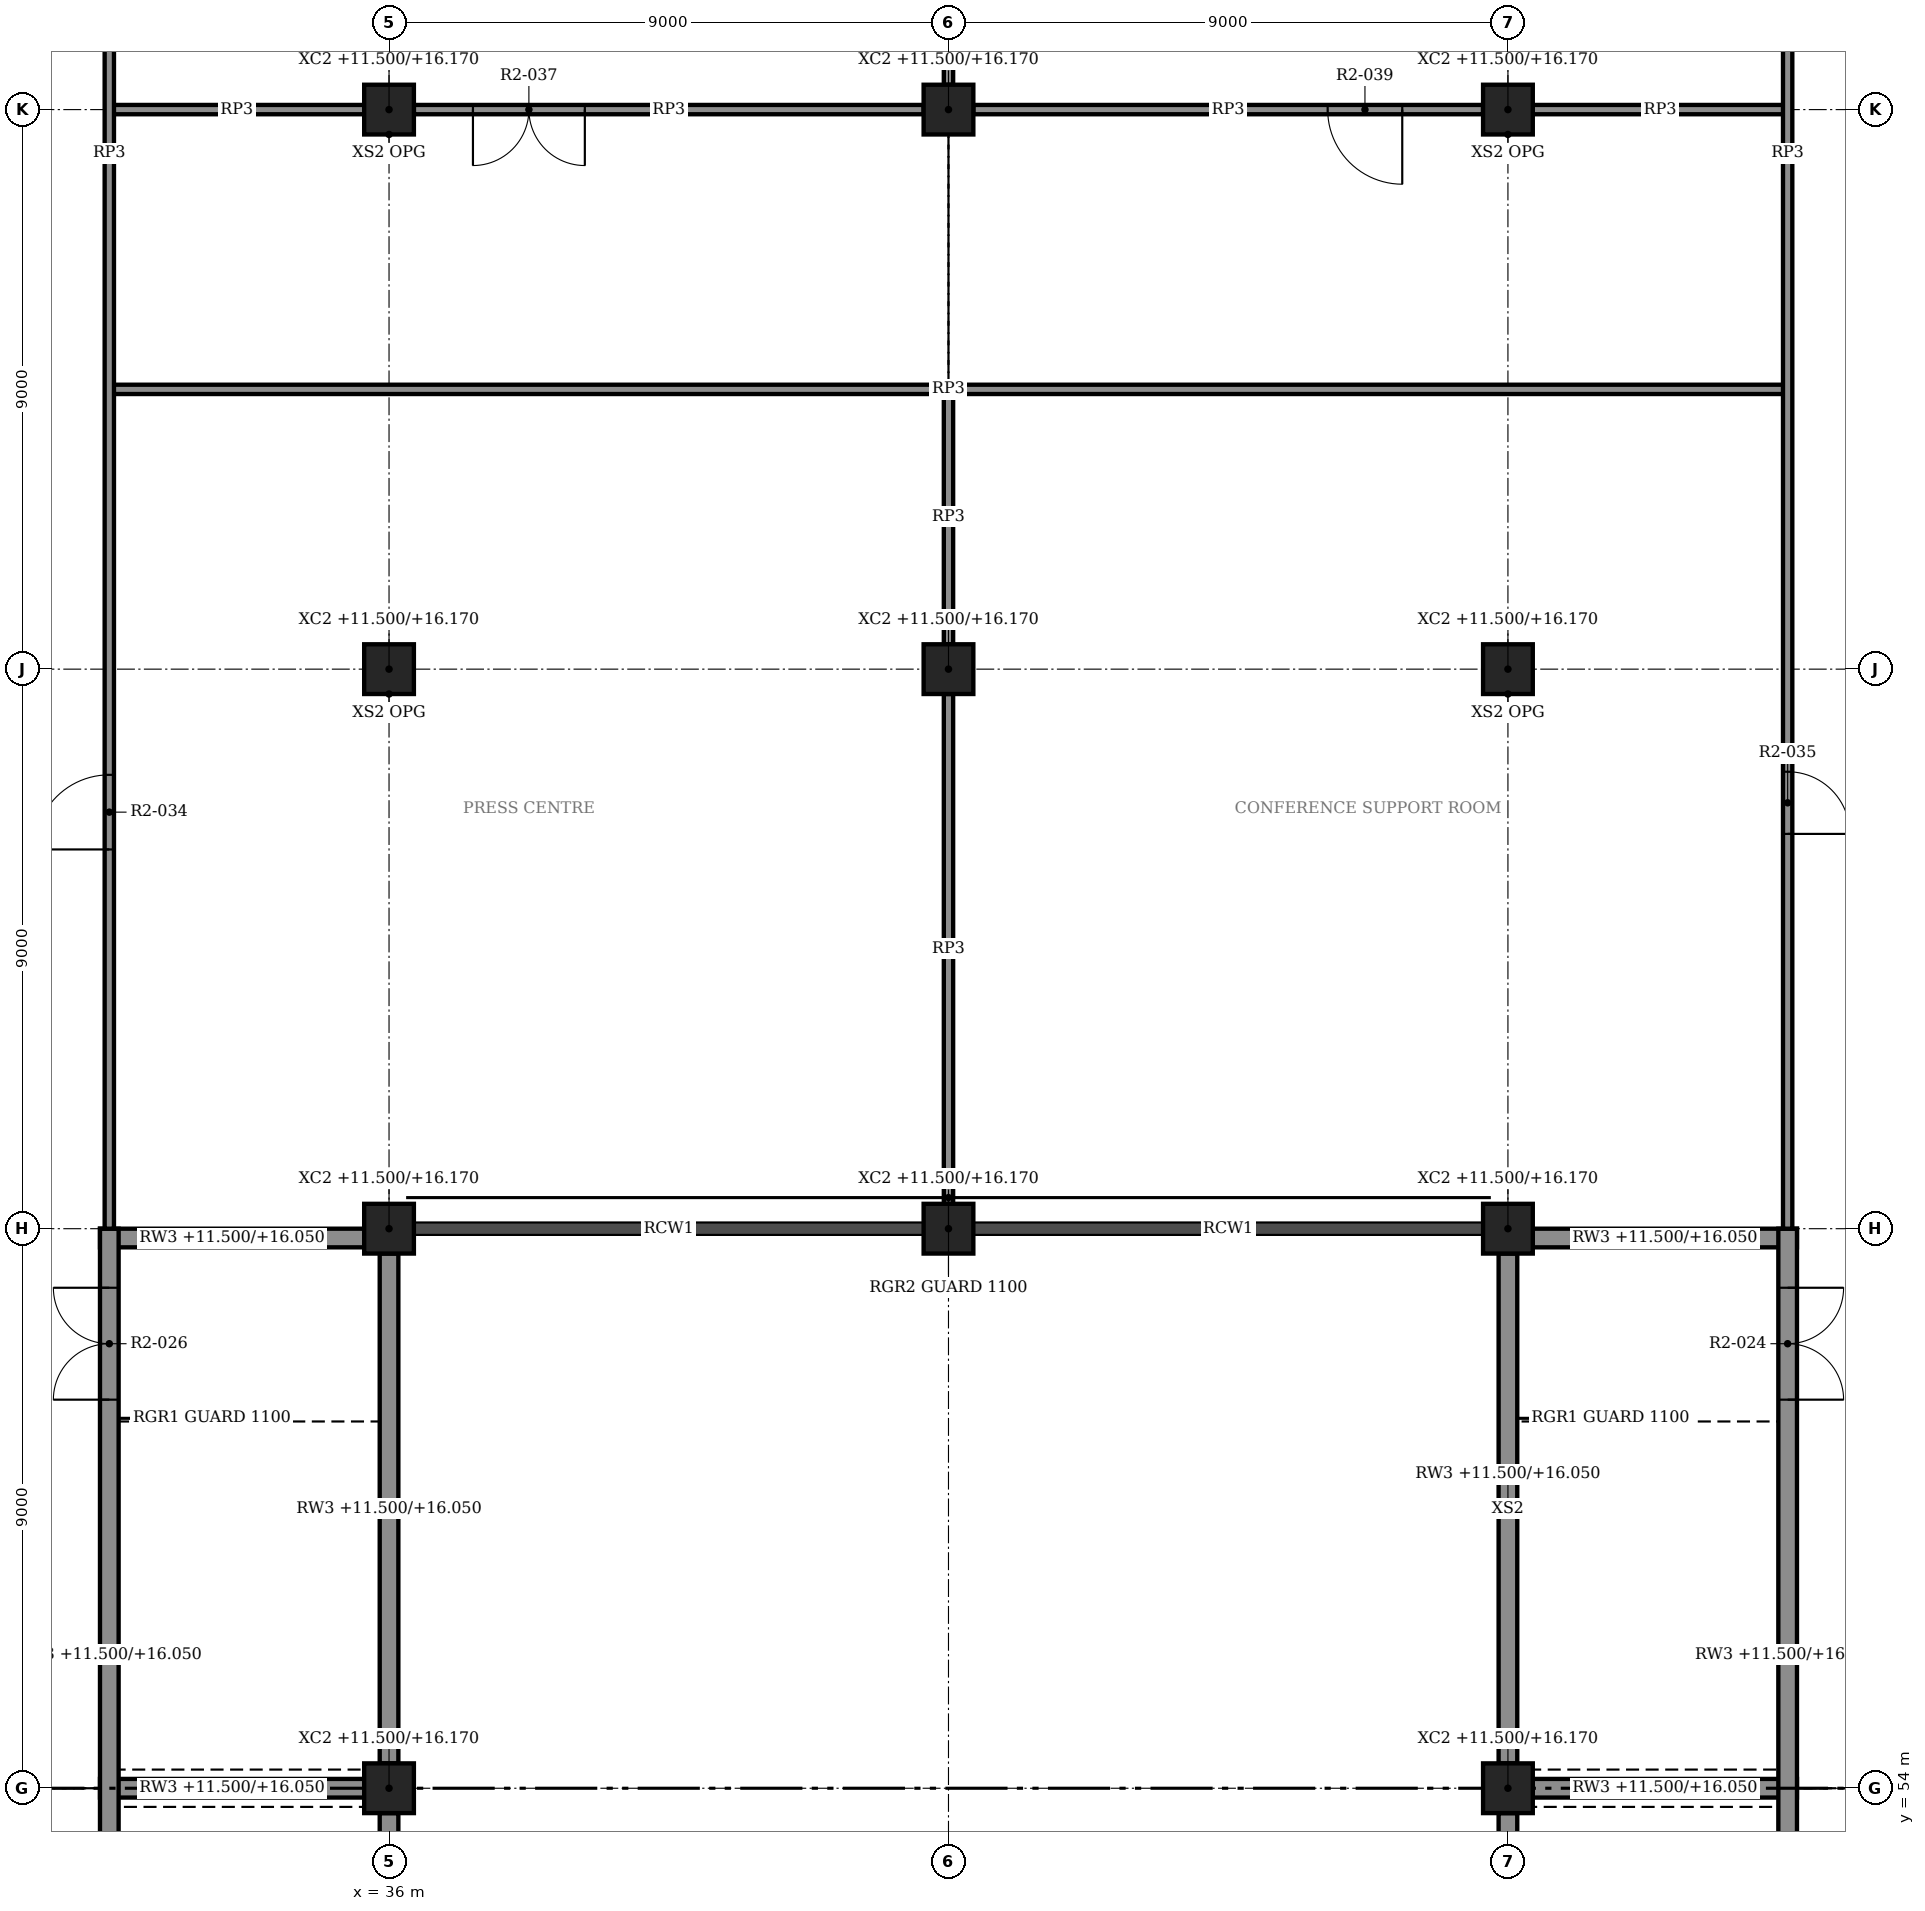
"""IFC4 building model, lengths in metres.
Left out: names, types, materials, properties, quantities, classifications, styles, units other than length and angle.
Written with IfcOpenShell. Run it as: python <this file> out.ifc"""

import sys

from ifc_helpers import new_model, si_unit, direction, frame, frame_2d, origin, origin_2d, place, context, subcontext, project, spatial, rectangle, extrude, element, fill, save


model = new_model("IFC4")
c1 = context("Model", 3, precision=1e-05, world=origin(), true_north=direction((0.0, 1.0)))
c2 = subcontext(c1, "Body", "Model", "MODEL_VIEW")
j1 = project(units=[si_unit("LENGTHUNIT", "METRE"), si_unit("PLANEANGLEUNIT", "RADIAN")], contexts=[c1])
p1 = place(None, origin())
s1 = spatial("IfcSite", under=j1, at=p1, CompositionType="ELEMENT")
p2 = place(p1, origin())
s2 = spatial("IfcBuilding", under=s1, at=p2, CompositionType="ELEMENT")
p3 = place(p2, frame((0.0, 0.0, 11.5)))
s3 = spatial("IfcBuildingStorey", under=s2, at=p3, CompositionType="ELEMENT", Elevation=11.5)
for number, where, z_axis, x_axis in (
    (1, (36.0, 54.0, 0.0), (0.0, 0.0, 1.0), (1.0, 0.0, 0.0)),
    (2, (36.0, 63.0, 0.0), (0.0, 0.0, 1.0), (1.0, 0.0, 0.0)),
    (3, (36.0, 72.0, 0.0), (0.0, 0.0, 1.0), (1.0, 0.0, 0.0)),
    (4, (36.0, 81.0, 0.0), (0.0, 0.0, 1.0), (1.0, 0.0, 0.0)),
    (5, (45.0, 63.0, 0.0), (0.0, 0.0, 1.0), (1.0, 0.0, 0.0)),
    (6, (45.0, 72.0, 0.0), (0.0, 0.0, 1.0), (1.0, 0.0, 0.0)),
    (7, (45.0, 81.0, 0.0), (0.0, 0.0, 1.0), (1.0, 0.0, 0.0)),
    (8, (54.0, 54.0, 0.0), (0.0, 0.0, 1.0), (1.0, 0.0, 0.0)),
    (9, (54.0, 63.0, 0.0), (0.0, 0.0, 1.0), (1.0, 0.0, 0.0)),
    (10, (54.0, 72.0, 0.0), (0.0, 0.0, 1.0), (1.0, 0.0, 0.0)),
    (11, (54.0, 81.0, 0.0), (0.0, 0.0, 1.0), (1.0, 0.0, 0.0)),
):
    element("IfcColumn", number, at=place(p3, frame(where, z_axis=z_axis, x_axis=x_axis)), inside=s3, PredefinedType="COLUMN", context=c2, shape_type="SweptSolid", body=[
        extrude(rectangle(XDim=0.8, YDim=0.8, at=origin_2d()), origin(), (0.0, 0.0, 1.0), 4.67),
    ])
p4 = place(p3, frame((58.5, 45.0, 0.0), z_axis=(0.0, 0.0, 1.0), x_axis=(0.0, 1.0, 0.0)))
e12 = element("IfcWall", 12, at=p4, inside=s3, PredefinedType="SOLIDWALL", context=c2, shape_type="SweptSolid", body=[
    extrude(rectangle(XDim=18.0, YDim=0.3, at=frame_2d((9.0, 0.0))), origin(), (0.0, 0.0, 1.0), 4.55),
])
p5 = place(p4, frame((0.85, 0.0, 0.0)))
e13 = element("IfcOpeningElement", 13, at=p5, cuts=e12, PredefinedType="OPENING", context=c2, shape_type="SweptSolid", body=[
    extrude(rectangle(XDim=1.8, YDim=2.4, at=frame_2d((0.9, 1.2))), frame((0.0, 0.16, 0.0), z_axis=(0.0, -1.0, 0.0), x_axis=(1.0, 0.0, 0.0)), (0.0, 0.0, 1.0), 0.32),
])
p6 = place(p4, frame((15.25, 0.0, 0.0)))
e14 = element("IfcOpeningElement", 14, at=p6, cuts=e12, PredefinedType="OPENING", context=c2, shape_type="SweptSolid", body=[
    extrude(rectangle(XDim=1.8, YDim=2.4, at=frame_2d((0.9, 1.2))), frame((0.0, 0.16, 0.0), z_axis=(0.0, -1.0, 0.0), x_axis=(1.0, 0.0, 0.0)), (0.0, 0.0, 1.0), 0.32),
])
for number, where, z_axis, x_axis in (
    (15, (54.0, 45.4, 0.0), (0.0, 0.0, 1.0), (0.0, 1.0, 0.0)),
    (16, (54.0, 54.4, 0.0), (0.0, 0.0, 1.0), (0.0, 1.0, 0.0)),
):
    element("IfcWall", number, at=place(p3, frame(where, z_axis=z_axis, x_axis=x_axis)), inside=s3, PredefinedType="SOLIDWALL", context=c2, shape_type="SweptSolid", body=[
        extrude(rectangle(XDim=8.2, YDim=0.3, at=frame_2d((4.1, 0.0))), origin(), (0.0, 0.0, 1.0), 4.55),
    ])
for number, where, z_axis, x_axis in (
    (17, (54.4, 54.0, 0.0), (0.0, 0.0, 1.0), (1.0, 0.0, 0.0)),
    (18, (54.4, 62.85, 0.0), (0.0, 0.0, 1.0), (1.0, 0.0, 0.0)),
):
    element("IfcWall", number, at=place(p3, frame(where, z_axis=z_axis, x_axis=x_axis)), inside=s3, PredefinedType="SOLIDWALL", context=c2, shape_type="SweptSolid", body=[
        extrude(rectangle(XDim=4.25, YDim=0.3, at=frame_2d((2.125, 0.0))), origin(), (0.0, 0.0, 1.0), 4.55),
    ])
p7 = place(p3, frame((31.5, 45.0, 0.0), z_axis=(0.0, 0.0, 1.0), x_axis=(0.0, 1.0, 0.0)))
e19 = element("IfcWall", 19, at=p7, inside=s3, PredefinedType="SOLIDWALL", context=c2, shape_type="SweptSolid", body=[
    extrude(rectangle(XDim=18.0, YDim=0.3, at=frame_2d((9.0, 0.0))), origin(), (0.0, 0.0, 1.0), 4.55),
])
p8 = place(p7, frame((0.85, 0.0, 0.0)))
e20 = element("IfcOpeningElement", 20, at=p8, cuts=e19, PredefinedType="OPENING", context=c2, shape_type="SweptSolid", body=[
    extrude(rectangle(XDim=1.8, YDim=2.4, at=frame_2d((0.9, 1.2))), frame((0.0, 0.16, 0.0), z_axis=(0.0, -1.0, 0.0), x_axis=(1.0, 0.0, 0.0)), (0.0, 0.0, 1.0), 0.32),
])
p9 = place(p7, frame((15.25, 0.0, 0.0)))
e21 = element("IfcOpeningElement", 21, at=p9, cuts=e19, PredefinedType="OPENING", context=c2, shape_type="SweptSolid", body=[
    extrude(rectangle(XDim=1.8, YDim=2.4, at=frame_2d((0.9, 1.2))), frame((0.0, 0.16, 0.0), z_axis=(0.0, -1.0, 0.0), x_axis=(1.0, 0.0, 0.0)), (0.0, 0.0, 1.0), 0.32),
])
for number, where, z_axis, x_axis in (
    (22, (36.0, 45.4, 0.0), (0.0, 0.0, 1.0), (0.0, 1.0, 0.0)),
    (23, (36.0, 54.4, 0.0), (0.0, 0.0, 1.0), (0.0, 1.0, 0.0)),
):
    element("IfcWall", number, at=place(p3, frame(where, z_axis=z_axis, x_axis=x_axis)), inside=s3, PredefinedType="SOLIDWALL", context=c2, shape_type="SweptSolid", body=[
        extrude(rectangle(XDim=8.2, YDim=0.3, at=frame_2d((4.1, 0.0))), origin(), (0.0, 0.0, 1.0), 4.55),
    ])
for number, where, z_axis, x_axis in (
    (24, (31.35, 54.0, 0.0), (0.0, 0.0, 1.0), (1.0, 0.0, 0.0)),
    (25, (31.35, 62.85, 0.0), (0.0, 0.0, 1.0), (1.0, 0.0, 0.0)),
):
    element("IfcWall", number, at=place(p3, frame(where, z_axis=z_axis, x_axis=x_axis)), inside=s3, PredefinedType="SOLIDWALL", context=c2, shape_type="SweptSolid", body=[
        extrude(rectangle(XDim=4.25, YDim=0.3, at=frame_2d((2.125, 0.0))), origin(), (0.0, 0.0, 1.0), 4.55),
    ])
p10 = place(p3, frame((31.5, 76.5, 0.0), z_axis=(0.0, 0.0, 1.0), x_axis=(1.0, 0.0, 0.0)))
e26 = element("IfcWall", 26, at=p10, inside=s3, PredefinedType="PARTITIONING", context=c2, shape_type="SweptSolid", body=[
    extrude(rectangle(XDim=27.0, YDim=0.15, at=frame_2d((13.5, 0.0))), origin(), (0.0, 0.0, 1.0), 4.55),
])
p11 = place(p3, frame((31.5, 81.0, 0.0), z_axis=(0.0, 0.0, 1.0), x_axis=(1.0, 0.0, 0.0)))
e27 = element("IfcWall", 27, at=p11, inside=s3, PredefinedType="PARTITIONING", context=c2, shape_type="SweptSolid", body=[
    extrude(rectangle(XDim=4.1, YDim=0.15, at=frame_2d((2.05, 0.0))), origin(), (0.0, 0.0, 1.0), 4.55),
])
p12 = place(p3, frame((36.4, 81.0, 0.0), z_axis=(0.0, 0.0, 1.0), x_axis=(1.0, 0.0, 0.0)))
e28 = element("IfcWall", 28, at=p12, inside=s3, PredefinedType="PARTITIONING", context=c2, shape_type="SweptSolid", body=[
    extrude(rectangle(XDim=8.2, YDim=0.15, at=frame_2d((4.1, 0.0))), origin(), (0.0, 0.0, 1.0), 4.55),
])
p13 = place(p12, frame((0.95, 0.0, 0.0)))
e29 = element("IfcOpeningElement", 29, at=p13, cuts=e28, PredefinedType="OPENING", context=c2, shape_type="SweptSolid", body=[
    extrude(rectangle(XDim=1.8, YDim=2.4, at=frame_2d((0.9, 1.2))), frame((0.0, 0.085, 0.0), z_axis=(0.0, -1.0, 0.0), x_axis=(1.0, 0.0, 0.0)), (0.0, 0.0, 1.0), 0.17),
])
p14 = place(p3, frame((45.4, 81.0, 0.0), z_axis=(0.0, 0.0, 1.0), x_axis=(1.0, 0.0, 0.0)))
e30 = element("IfcWall", 30, at=p14, inside=s3, PredefinedType="PARTITIONING", context=c2, shape_type="SweptSolid", body=[
    extrude(rectangle(XDim=8.2, YDim=0.15, at=frame_2d((4.1, 0.0))), origin(), (0.0, 0.0, 1.0), 4.55),
])
p15 = place(p14, frame((5.7, 0.0, 0.0)))
e31 = element("IfcOpeningElement", 31, at=p15, cuts=e30, PredefinedType="OPENING", context=c2, shape_type="SweptSolid", body=[
    extrude(rectangle(XDim=1.2, YDim=2.4, at=frame_2d((0.6, 1.2))), frame((0.0, 0.085, 0.0), z_axis=(0.0, -1.0, 0.0), x_axis=(1.0, 0.0, 0.0)), (0.0, 0.0, 1.0), 0.17),
])
p16 = place(p3, frame((54.4, 81.0, 0.0), z_axis=(0.0, 0.0, 1.0), x_axis=(1.0, 0.0, 0.0)))
e32 = element("IfcWall", 32, at=p16, inside=s3, PredefinedType="PARTITIONING", context=c2, shape_type="SweptSolid", body=[
    extrude(rectangle(XDim=4.1, YDim=0.15, at=frame_2d((2.05, 0.0))), origin(), (0.0, 0.0, 1.0), 4.55),
])
p17 = place(p3, frame((31.5, 63.0, 0.0), z_axis=(0.0, 0.0, 1.0), x_axis=(0.0, 1.0, 0.0)))
e33 = element("IfcWall", 33, at=p17, inside=s3, PredefinedType="PARTITIONING", context=c2, shape_type="SweptSolid", body=[
    extrude(rectangle(XDim=36.0, YDim=0.15, at=frame_2d((18.0, 0.0))), origin(), (0.0, 0.0, 1.0), 4.55),
])
p18 = place(p17, frame((6.1, 0.0, 0.0)))
e34 = element("IfcOpeningElement", 34, at=p18, cuts=e33, PredefinedType="OPENING", context=c2, shape_type="SweptSolid", body=[
    extrude(rectangle(XDim=1.2, YDim=2.4, at=frame_2d((0.6, 1.2))), frame((0.0, 0.085, 0.0), z_axis=(0.0, -1.0, 0.0), x_axis=(1.0, 0.0, 0.0)), (0.0, 0.0, 1.0), 0.17),
])
p19 = place(p17, frame((26.1, 0.0, 0.0)))
e35 = element("IfcOpeningElement", 35, at=p19, cuts=e33, PredefinedType="OPENING", context=c2, shape_type="SweptSolid", body=[
    extrude(rectangle(XDim=1.8, YDim=2.4, at=frame_2d((0.9, 1.2))), frame((0.0, 0.085, 0.0), z_axis=(0.0, -1.0, 0.0), x_axis=(1.0, 0.0, 0.0)), (0.0, 0.0, 1.0), 0.17),
])
p20 = place(p3, frame((45.0, 63.4, 0.0), z_axis=(0.0, 0.0, 1.0), x_axis=(0.0, 1.0, 0.0)))
e36 = element("IfcWall", 36, at=p20, inside=s3, PredefinedType="PARTITIONING", context=c2, shape_type="SweptSolid", body=[
    extrude(rectangle(XDim=8.2, YDim=0.15, at=frame_2d((4.1, 0.0))), origin(), (0.0, 0.0, 1.0), 4.55),
])
p21 = place(p3, frame((45.0, 72.4, 0.0), z_axis=(0.0, 0.0, 1.0), x_axis=(0.0, 1.0, 0.0)))
e37 = element("IfcWall", 37, at=p21, inside=s3, PredefinedType="PARTITIONING", context=c2, shape_type="SweptSolid", body=[
    extrude(rectangle(XDim=4.1, YDim=0.15, at=frame_2d((2.05, 0.0))), origin(), (0.0, 0.0, 1.0), 4.55),
])
p22 = place(p3, frame((45.0, 81.4, 0.0), z_axis=(0.0, 0.0, 1.0), x_axis=(0.0, 1.0, 0.0)))
e38 = element("IfcWall", 38, at=p22, inside=s3, PredefinedType="PARTITIONING", context=c2, shape_type="SweptSolid", body=[
    extrude(rectangle(XDim=8.2, YDim=0.15, at=frame_2d((4.1, 0.0))), origin(), (0.0, 0.0, 1.0), 4.55),
])
p23 = place(p3, frame((58.5, 63.0, 0.0), z_axis=(0.0, 0.0, 1.0), x_axis=(0.0, 1.0, 0.0)))
e39 = element("IfcWall", 39, at=p23, inside=s3, PredefinedType="PARTITIONING", context=c2, shape_type="SweptSolid", body=[
    extrude(rectangle(XDim=36.0, YDim=0.15, at=frame_2d((18.0, 0.0))), origin(), (0.0, 0.0, 1.0), 4.55),
])
p24 = place(p23, frame((6.35, 0.0, 0.0)))
e40 = element("IfcOpeningElement", 40, at=p24, cuts=e39, PredefinedType="OPENING", context=c2, shape_type="SweptSolid", body=[
    extrude(rectangle(XDim=1.0, YDim=2.4, at=frame_2d((0.5, 1.2))), frame((0.0, 0.085, 0.0), z_axis=(0.0, -1.0, 0.0), x_axis=(1.0, 0.0, 0.0)), (0.0, 0.0, 1.0), 0.17),
])
p25 = place(p23, frame((26.35, 0.0, 0.0)))
e41 = element("IfcOpeningElement", 41, at=p25, cuts=e39, PredefinedType="OPENING", context=c2, shape_type="SweptSolid", body=[
    extrude(rectangle(XDim=1.2, YDim=2.4, at=frame_2d((0.6, 1.2))), frame((0.0, 0.085, 0.0), z_axis=(0.0, -1.0, 0.0), x_axis=(1.0, 0.0, 0.0)), (0.0, 0.0, 1.0), 0.17),
])
p26 = place(p6, frame((1.8, 0.0, 0.0), z_axis=(0.0, 0.0, 1.0), x_axis=(-1.0, 0.0, 0.0)))
e42 = element("IfcDoor", 42, at=p26, inside=s3, OperationType="DOUBLE_DOOR_SINGLE_SWING", PredefinedType="DOOR", context=c2, shape_type="SweptSolid", body=[
    extrude(rectangle(XDim=1.8, YDim=2.4, at=frame_2d((0.9, 1.2))), frame((0.0, 0.025, 0.0), z_axis=(0.0, -1.0, 0.0), x_axis=(1.0, 0.0, 0.0)), (0.0, 0.0, 1.0), 0.05),
])
fill(e14, e42)
p27 = place(p9, origin())
e43 = element("IfcDoor", 43, at=p27, inside=s3, OperationType="DOUBLE_DOOR_SINGLE_SWING", PredefinedType="DOOR", context=c2, shape_type="SweptSolid", body=[
    extrude(rectangle(XDim=1.8, YDim=2.4, at=frame_2d((0.9, 1.2))), frame((0.0, 0.025, 0.0), z_axis=(0.0, -1.0, 0.0), x_axis=(1.0, 0.0, 0.0)), (0.0, 0.0, 1.0), 0.05),
])
fill(e21, e43)
p28 = place(p18, origin())
e44 = element("IfcDoor", 44, at=p28, inside=s3, OperationType="SINGLE_SWING_LEFT", PredefinedType="DOOR", context=c2, shape_type="SweptSolid", body=[
    extrude(rectangle(XDim=1.2, YDim=2.4, at=frame_2d((0.6, 1.2))), frame((0.0, 0.025, 0.0), z_axis=(0.0, -1.0, 0.0), x_axis=(1.0, 0.0, 0.0)), (0.0, 0.0, 1.0), 0.05),
])
fill(e34, e44)
p29 = place(p24, frame((1.0, 0.0, 0.0), z_axis=(0.0, 0.0, 1.0), x_axis=(-1.0, 0.0, 0.0)))
e45 = element("IfcDoor", 45, at=p29, inside=s3, OperationType="SINGLE_SWING_LEFT", PredefinedType="DOOR", context=c2, shape_type="SweptSolid", body=[
    extrude(rectangle(XDim=1.0, YDim=2.4, at=frame_2d((0.5, 1.2))), frame((0.0, 0.025, 0.0), z_axis=(0.0, -1.0, 0.0), x_axis=(1.0, 0.0, 0.0)), (0.0, 0.0, 1.0), 0.05),
])
fill(e40, e45)
p30 = place(p13, frame((1.8, 0.0, 0.0), z_axis=(0.0, 0.0, 1.0), x_axis=(-1.0, 0.0, 0.0)))
e46 = element("IfcDoor", 46, at=p30, inside=s3, OperationType="DOUBLE_DOOR_SINGLE_SWING", PredefinedType="DOOR", context=c2, shape_type="SweptSolid", body=[
    extrude(rectangle(XDim=1.8, YDim=2.4, at=frame_2d((0.9, 1.2))), frame((0.0, 0.025, 0.0), z_axis=(0.0, -1.0, 0.0), x_axis=(1.0, 0.0, 0.0)), (0.0, 0.0, 1.0), 0.05),
])
fill(e29, e46)
p31 = place(p15, frame((1.2, 0.0, 0.0), z_axis=(0.0, 0.0, 1.0), x_axis=(-1.0, 0.0, 0.0)))
e47 = element("IfcDoor", 47, at=p31, inside=s3, OperationType="SINGLE_SWING_LEFT", PredefinedType="DOOR", context=c2, shape_type="SweptSolid", body=[
    extrude(rectangle(XDim=1.2, YDim=2.4, at=frame_2d((0.6, 1.2))), frame((0.0, 0.025, 0.0), z_axis=(0.0, -1.0, 0.0), x_axis=(1.0, 0.0, 0.0)), (0.0, 0.0, 1.0), 0.05),
])
fill(e31, e47)
save(model, sys.argv[1])
